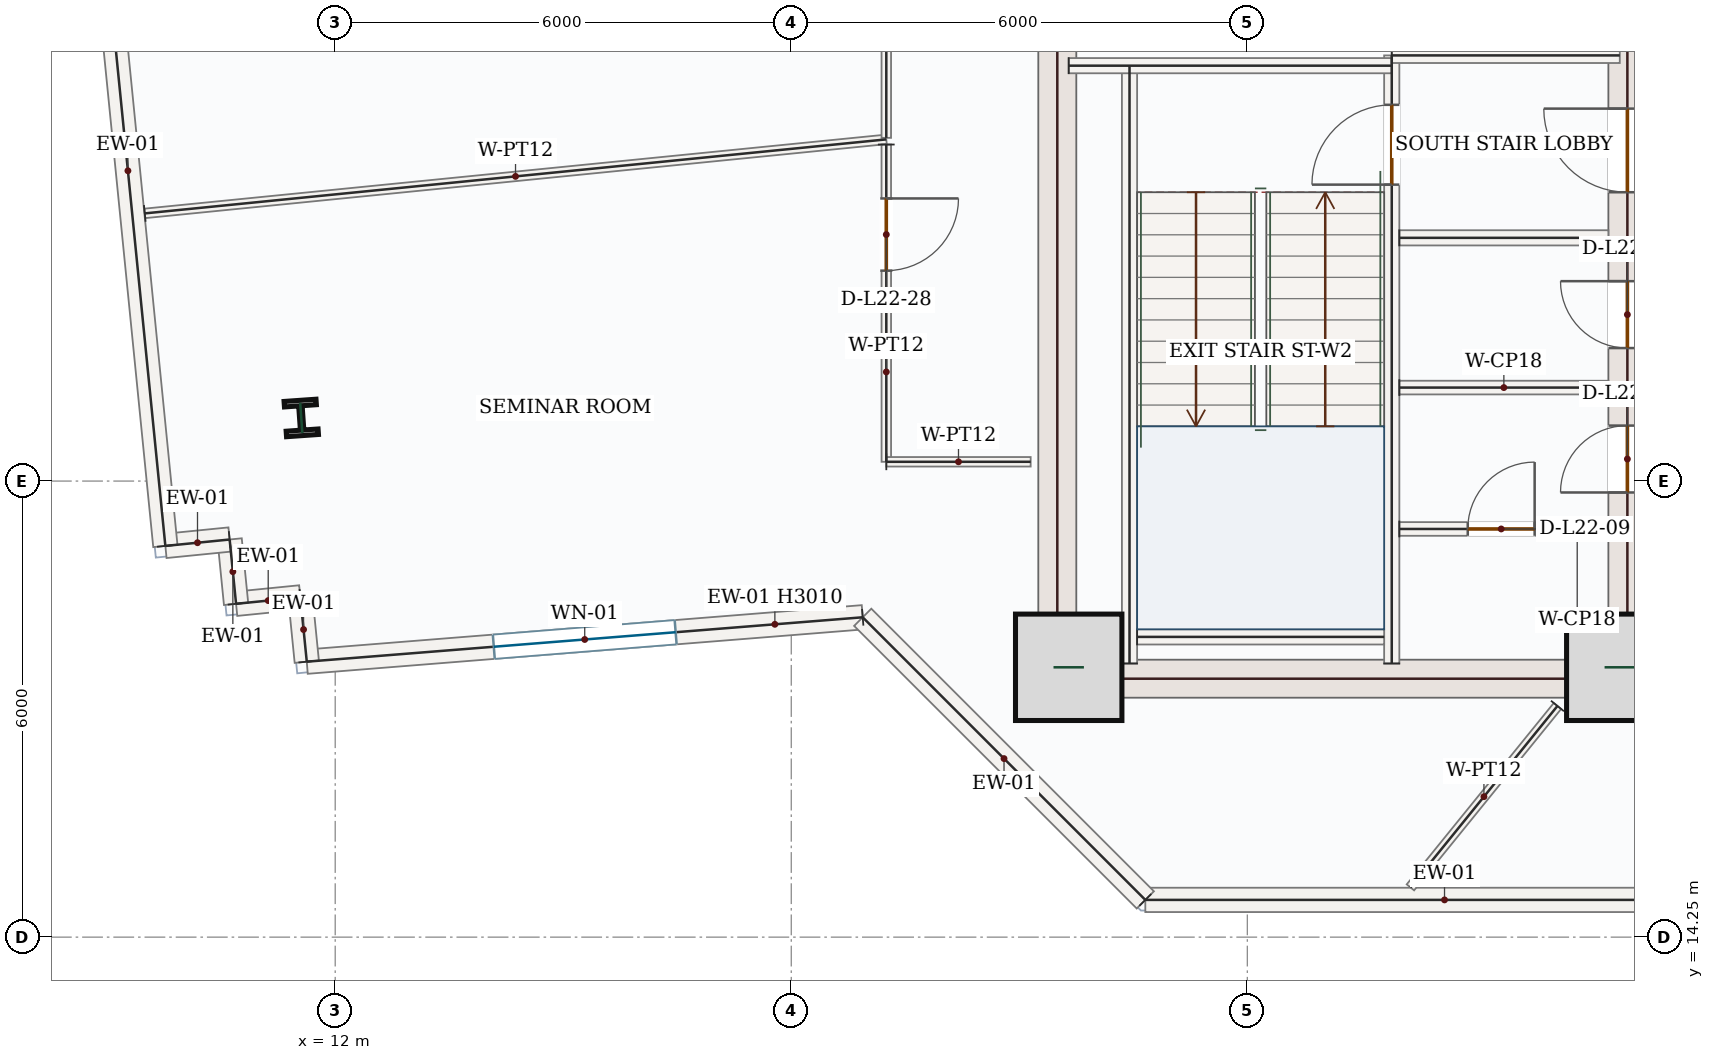
"""IFC4 building model, lengths in metres.
Left out: names, types, materials, properties, quantities, classifications, styles, units other than length and angle.
Written with IfcOpenShell. Run it as: python <this file> out.ifc"""

import sys

from ifc_helpers import new_model, si_unit, direction, frame, frame_2d, origin, origin_2d, place, context, subcontext, project, spatial, rectangle, i_section, extrude, source, transform, mapped, element, fill, save


model = new_model("IFC4")
c1 = context("Model", 3, precision=1e-05, world=origin(), true_north=direction((0.0, 1.0)))
c2 = subcontext(c1, "Body", "Model", "MODEL_VIEW")
j1 = project(units=[si_unit("LENGTHUNIT", "METRE"), si_unit("PLANEANGLEUNIT", "RADIAN")], contexts=[c1])
p1 = place(None, origin())
s1 = spatial("IfcSite", under=j1, at=p1, CompositionType="ELEMENT")
p2 = place(p1, origin())
s2 = spatial("IfcBuilding", under=s1, at=p2, CompositionType="ELEMENT")
p3 = place(p2, frame((0.0, 0.0, 100.5)))
s3 = spatial("IfcBuildingStorey", under=s2, at=p3, CompositionType="ELEMENT", Elevation=100.5)
m1 = source(origin(), c2, "Body", "SweptSolid", [
    extrude(rectangle(XDim=8.55, YDim=0.5, at=frame_2d((4.275, 0.0))), origin(), (0.0, 0.0, 1.0), 3.95),
])
p4 = place(p3, frame((21.5, 17.4, 0.0), z_axis=(0.0, 0.0, 1.0), x_axis=(0.0, 1.0, 0.0)))
e1 = element("IfcWall", 1, at=p4, inside=s3, PredefinedType="SHEAR", context=c2, shape_type="MappedRepresentation", body=[
    mapped(m1, transform((0.0, 0.0, 0.0), x_axis=(1.0, 0.0, 0.0), y_axis=(0.0, 1.0, 0.0), z_axis=(0.0, 0.0, 1.0), scale=1.0)),
])
p5 = place(p3, frame((29.0, 17.4, 0.0), z_axis=(0.0, 0.0, 1.0), x_axis=(0.0, 1.0, 0.0)))
e2 = element("IfcWall", 2, at=p5, inside=s3, PredefinedType="SHEAR", context=c2, shape_type="SweptSolid", body=[
    extrude(rectangle(XDim=8.55, YDim=0.5, at=frame_2d((4.275, 0.0))), origin(), (0.0, 0.0, 1.0), 3.95),
])
p6 = place(p5, frame((6.65, 0.0, 0.0)))
e3 = element("IfcOpeningElement", 3, at=p6, cuts=e2, PredefinedType="OPENING", context=c2, shape_type="SweptSolid", body=[
    extrude(rectangle(XDim=1.1, YDim=2.2, at=frame_2d((0.55, 1.1))), frame((0.0, 0.26, 0.0), z_axis=(0.0, -1.0, 0.0), x_axis=(1.0, 0.0, 0.0)), (0.0, 0.0, 1.0), 0.52),
])
p7 = place(p5, frame((2.7, 0.0, 0.0)))
e4 = element("IfcOpeningElement", 4, at=p7, cuts=e2, PredefinedType="OPENING", context=c2, shape_type="SweptSolid", body=[
    extrude(rectangle(XDim=0.88, YDim=2.1, at=frame_2d((0.44, 1.05))), frame((0.0, 0.26, 0.0), z_axis=(0.0, -1.0, 0.0), x_axis=(1.0, 0.0, 0.0)), (0.0, 0.0, 1.0), 0.52),
])
p8 = place(p5, frame((4.6, 0.0, 0.0)))
e5 = element("IfcOpeningElement", 5, at=p8, cuts=e2, PredefinedType="OPENING", context=c2, shape_type="SweptSolid", body=[
    extrude(rectangle(XDim=0.88, YDim=2.1, at=frame_2d((0.44, 1.05))), frame((0.0, 0.26, 0.0), z_axis=(0.0, -1.0, 0.0), x_axis=(1.0, 0.0, 0.0)), (0.0, 0.0, 1.0), 0.52),
])
m2 = source(origin(), c2, "Body", "SweptSolid", [
    extrude(rectangle(XDim=7.0, YDim=0.5, at=frame_2d((3.5, 0.0))), origin(), (0.0, 0.0, 1.0), 3.95),
])
p9 = place(p3, frame((21.75, 17.65, 0.0), z_axis=(0.0, 0.0, 1.0), x_axis=(1.0, 0.0, 0.0)))
e6 = element("IfcWall", 6, at=p9, inside=s3, PredefinedType="SHEAR", context=c2, shape_type="MappedRepresentation", body=[
    mapped(m2, transform((0.0, 0.0, 0.0), x_axis=(1.0, 0.0, 0.0), y_axis=(0.0, 1.0, 0.0), z_axis=(0.0, 0.0, 1.0), scale=1.0)),
])
m3 = source(origin(), c2, "Body", "SweptSolid", [
    extrude(rectangle(XDim=1.4, YDim=1.4, at=origin_2d()), origin(), (0.0, 0.0, 1.0), 4.2),
])
for number, where, z_axis, x_axis in (
    (7, (21.65, 17.8, 0.0), (0.0, 0.0, 1.0), (1.0, 0.0, 0.0)),
    (8, (28.9, 17.8, 0.0), (0.0, 0.0, 1.0), (1.0, 0.0, 0.0)),
):
    element("IfcColumn", number, at=place(p3, frame(where, z_axis=z_axis, x_axis=x_axis)), inside=s3, PredefinedType="COLUMN", context=c2, shape_type="MappedRepresentation", body=[
        mapped(m3, transform((0.0, 0.0, 0.0), x_axis=(1.0, 0.0, 0.0), y_axis=(0.0, 1.0, 0.0), z_axis=(0.0, 0.0, 1.0), scale=1.0)),
    ])
m4 = source(origin(), c2, "Body", "SweptSolid", [
    extrude(i_section(OverallWidth=0.421, OverallDepth=0.465, WebThickness=0.045, FlangeThickness=0.073, FilletRadius=0.018, at=origin_2d()), origin(), (0.0, 0.0, 1.0), 4.2),
])
p10 = place(p3, frame((11.553, 21.08, 0.0), z_axis=(0.0, 0.0, 1.0), x_axis=(0.99756405026, 0.069756473744, 0.0)))
e9 = element("IfcColumn", 9, at=p10, inside=s3, PredefinedType="COLUMN", context=c2, shape_type="MappedRepresentation", body=[
    mapped(m4, transform((0.0, 0.0, 0.0), x_axis=(1.0, 0.0, 0.0), y_axis=(0.0, 1.0, 0.0), z_axis=(0.0, 0.0, 1.0), scale=1.0)),
])
p11 = place(p3, frame((18.94, 18.458, 0.0), z_axis=(0.0, 0.0, 1.0), x_axis=(-0.996827539556, -0.079591811023, 0.0)))
e10 = element("IfcWall", 10, at=p11, inside=s3, PredefinedType="SOLIDWALL", context=c2, shape_type="SweptSolid", body=[
    extrude(rectangle(XDim=7.337, YDim=0.32, at=frame_2d((3.668, 0.0))), origin(), (0.0, 0.0, 1.0), 3.01),
])
p12 = place(p11, frame((2.469, 0.0, 0.85)))
e11 = element("IfcOpeningElement", 11, at=p12, cuts=e10, PredefinedType="OPENING", context=c2, shape_type="SweptSolid", body=[
    extrude(rectangle(XDim=2.4, YDim=1.8, at=frame_2d((1.2, 0.9))), frame((0.0, 0.17, 0.0), z_axis=(0.0, -1.0, 0.0), x_axis=(1.0, 0.0, 0.0)), (0.0, 0.0, 1.0), 0.34),
])
m5 = source(origin(), c2, "Body", "SweptSolid", [
    extrude(rectangle(XDim=0.85, YDim=0.32, at=frame_2d((0.425, 0.0))), origin(), (0.0, 0.0, 1.0), 3.95),
])
p13 = place(p3, frame((11.626, 17.874, 0.0), z_axis=(0.0, 0.0, 1.0), x_axis=(-0.09938995433, 0.995048560111, 0.0)))
e12 = element("IfcWall", 12, at=p13, inside=s3, PredefinedType="SOLIDWALL", context=c2, shape_type="MappedRepresentation", body=[
    mapped(m5, transform((0.0, 0.0, 0.0), x_axis=(1.0, 0.0, 0.0), y_axis=(0.0, 1.0, 0.0), z_axis=(0.0, 0.0, 1.0), scale=1.0)),
])
m6 = source(origin(), c2, "Body", "SweptSolid", [
    extrude(rectangle(XDim=0.85, YDim=0.32, at=frame_2d((0.425, 0.0))), origin(), (0.0, 0.0, 1.0), 3.95),
])
p14 = place(p3, frame((11.542, 18.72, 0.0), z_axis=(0.0, 0.0, 1.0), x_axis=(-0.995079749343, -0.09907720448, 0.0)))
e13 = element("IfcWall", 13, at=p14, inside=s3, PredefinedType="SOLIDWALL", context=c2, shape_type="MappedRepresentation", body=[
    mapped(m6, transform((0.0, 0.0, 0.0), x_axis=(1.0, 0.0, 0.0), y_axis=(0.0, 1.0, 0.0), z_axis=(0.0, 0.0, 1.0), scale=1.0)),
])
for number, where, z_axis, x_axis in (
    (14, (10.696, 18.635, 0.0), (0.0, 0.0, 1.0), (-0.099, 0.995, 0.0)),
    (15, (10.611, 19.481, 0.0), (0.0, 0.0, 1.0), (-0.995, -0.099, 0.0)),
):
    element("IfcWall", number, at=place(p3, frame(where, z_axis=z_axis, x_axis=x_axis)), inside=s3, PredefinedType="SOLIDWALL", context=c2, shape_type="MappedRepresentation", body=[
        mapped(m5, transform((0.0, 0.0, 0.0), x_axis=(1.0, 0.0, 0.0), y_axis=(0.0, 1.0, 0.0), z_axis=(0.0, 0.0, 1.0), scale=1.0)),
    ])
m7 = source(origin(), c2, "Body", "SweptSolid", [
    extrude(rectangle(XDim=9.92, YDim=0.32, at=frame_2d((4.96, 0.0))), origin(), (0.0, 0.0, 1.0), 3.95),
])
p15 = place(p3, frame((9.765, 19.397, 0.0), z_axis=(0.0, 0.0, 1.0), x_axis=(-0.099303907908, 0.995057151059, 0.0)))
e16 = element("IfcWall", 16, at=p15, inside=s3, PredefinedType="SOLIDWALL", context=c2, shape_type="MappedRepresentation", body=[
    mapped(m7, transform((0.0, 0.0, 0.0), x_axis=(1.0, 0.0, 0.0), y_axis=(0.0, 1.0, 0.0), z_axis=(0.0, 0.0, 1.0), scale=1.0)),
])
m8 = source(origin(), c2, "Body", "SweptSolid", [
    extrude(rectangle(XDim=7.873, YDim=0.32, at=frame_2d((3.936, 0.0))), origin(), (0.0, 0.0, 1.0), 3.95),
])
p16 = place(p3, frame((30.531, 14.74, 0.0), z_axis=(0.0, 0.0, 1.0), x_axis=(-1.0, 0.0, 0.0)))
e17 = element("IfcWall", 17, at=p16, inside=s3, PredefinedType="SOLIDWALL", context=c2, shape_type="MappedRepresentation", body=[
    mapped(m8, transform((0.0, 0.0, 0.0), x_axis=(1.0, 0.0, 0.0), y_axis=(0.0, 1.0, 0.0), z_axis=(0.0, 0.0, 1.0), scale=1.0)),
])
m9 = source(origin(), c2, "Body", "SweptSolid", [
    extrude(rectangle(XDim=5.258, YDim=0.32, at=frame_2d((2.629, 0.0))), origin(), (0.0, 0.0, 1.0), 3.95),
])
p17 = place(p3, frame((22.658, 14.74, 0.0), z_axis=(0.0, 0.0, 1.0), x_axis=(-0.707106781187, 0.707106781187, 0.0)))
e18 = element("IfcWall", 18, at=p17, inside=s3, PredefinedType="SOLIDWALL", context=c2, shape_type="MappedRepresentation", body=[
    mapped(m9, transform((0.0, 0.0, 0.0), x_axis=(1.0, 0.0, 0.0), y_axis=(0.0, 1.0, 0.0), z_axis=(0.0, 0.0, 1.0), scale=1.0)),
])
m10 = source(origin(), c2, "Body", "SweptSolid", [
    extrude(rectangle(XDim=7.87, YDim=0.2, at=frame_2d((3.935, 0.0))), origin(), (0.0, 0.0, 1.0), 3.95),
])
p18 = place(p3, frame((22.45, 17.85, 0.0), z_axis=(0.0, 0.0, 1.0), x_axis=(0.0, 1.0, 0.0)))
e19 = element("IfcWall", 19, at=p18, inside=s3, PredefinedType="SOLIDWALL", context=c2, shape_type="MappedRepresentation", body=[
    mapped(m10, transform((0.0, 0.0, 0.0), x_axis=(1.0, 0.0, 0.0), y_axis=(0.0, 1.0, 0.0), z_axis=(0.0, 0.0, 1.0), scale=1.0)),
])
p19 = place(p3, frame((25.9, 17.85, 0.0), z_axis=(0.0, 0.0, 1.0), x_axis=(0.0, 1.0, 0.0)))
e20 = element("IfcWall", 20, at=p19, inside=s3, PredefinedType="SOLIDWALL", context=c2, shape_type="SweptSolid", body=[
    extrude(rectangle(XDim=8.0, YDim=0.2, at=frame_2d((4.0, 0.0))), origin(), (0.0, 0.0, 1.0), 3.95),
])
p20 = place(p19, frame((6.3, 0.0, 0.0)))
e21 = element("IfcOpeningElement", 21, at=p20, cuts=e20, PredefinedType="OPENING", context=c2, shape_type="SweptSolid", body=[
    extrude(rectangle(XDim=1.05, YDim=2.15, at=frame_2d((0.525, 1.075))), frame((0.0, 0.11, 0.0), z_axis=(0.0, -1.0, 0.0), x_axis=(1.0, 0.0, 0.0)), (0.0, 0.0, 1.0), 0.22),
])
m11 = source(origin(), c2, "Body", "SweptSolid", [
    extrude(rectangle(XDim=4.25, YDim=0.2, at=frame_2d((2.125, 0.0))), origin(), (0.0, 0.0, 1.0), 3.95),
])
p21 = place(p3, frame((21.65, 25.715, 0.0), z_axis=(0.0, 0.0, 1.0), x_axis=(1.0, 0.0, 0.0)))
e22 = element("IfcWall", 22, at=p21, inside=s3, PredefinedType="SOLIDWALL", context=c2, shape_type="MappedRepresentation", body=[
    mapped(m11, transform((0.0, 0.0, 0.0), x_axis=(1.0, 0.0, 0.0), y_axis=(0.0, 1.0, 0.0), z_axis=(0.0, 0.0, 1.0), scale=1.0)),
])
m12 = source(origin(), c2, "Body", "SweptSolid", [
    extrude(rectangle(XDim=3.0, YDim=0.2, at=frame_2d((1.5, 0.0))), origin(), (0.0, 0.0, 1.0), 3.95),
])
p22 = place(p3, frame((25.9, 25.85, 0.0), z_axis=(0.0, 0.0, 1.0), x_axis=(1.0, 0.0, 0.0)))
e23 = element("IfcWall", 23, at=p22, inside=s3, PredefinedType="SOLIDWALL", context=c2, shape_type="MappedRepresentation", body=[
    mapped(m12, transform((0.0, 0.0, 0.0), x_axis=(1.0, 0.0, 0.0), y_axis=(0.0, 1.0, 0.0), z_axis=(0.0, 0.0, 1.0), scale=1.0)),
])
m13 = source(origin(), c2, "Body", "SweptSolid", [
    extrude(rectangle(XDim=3.25, YDim=0.2, at=frame_2d((1.625, 0.0))), origin(), (0.0, 0.0, 1.0), 3.95),
])
p23 = place(p3, frame((22.55, 18.2, 0.0), z_axis=(0.0, 0.0, 1.0), x_axis=(1.0, 0.0, 0.0)))
e24 = element("IfcWall", 24, at=p23, inside=s3, PredefinedType="SOLIDWALL", context=c2, shape_type="MappedRepresentation", body=[
    mapped(m13, transform((0.0, 0.0, 0.0), x_axis=(1.0, 0.0, 0.0), y_axis=(0.0, 1.0, 0.0), z_axis=(0.0, 0.0, 1.0), scale=1.0)),
])
m14 = source(origin(), c2, "Body", "SweptSolid", [
    extrude(rectangle(XDim=2.75, YDim=0.2, at=frame_2d((1.375, 0.0))), origin(), (0.0, 0.0, 1.0), 3.95),
])
p24 = place(p3, frame((26.0, 23.45, 0.0), z_axis=(0.0, 0.0, 1.0), x_axis=(1.0, 0.0, 0.0)))
e25 = element("IfcWall", 25, at=p24, inside=s3, PredefinedType="SOLIDWALL", context=c2, shape_type="MappedRepresentation", body=[
    mapped(m14, transform((0.0, 0.0, 0.0), x_axis=(1.0, 0.0, 0.0), y_axis=(0.0, 1.0, 0.0), z_axis=(0.0, 0.0, 1.0), scale=1.0)),
])
p25 = place(p3, frame((26.0, 19.62, 0.0), z_axis=(0.0, 0.0, 1.0), x_axis=(1.0, 0.0, 0.0)))
e26 = element("IfcWall", 26, at=p25, inside=s3, PredefinedType="PARTITIONING", context=c2, shape_type="SweptSolid", body=[
    extrude(rectangle(XDim=2.75, YDim=0.18, at=frame_2d((1.375, 0.0))), origin(), (0.0, 0.0, 1.0), 3.95),
])
p26 = place(p25, frame((0.9, 0.0, 0.0)))
e27 = element("IfcOpeningElement", 27, at=p26, cuts=e26, PredefinedType="OPENING", context=c2, shape_type="SweptSolid", body=[
    extrude(rectangle(XDim=0.88, YDim=2.1, at=frame_2d((0.44, 1.05))), frame((0.0, 0.1, 0.0), z_axis=(0.0, -1.0, 0.0), x_axis=(1.0, 0.0, 0.0)), (0.0, 0.0, 1.0), 0.2),
])
m15 = source(origin(), c2, "Body", "SweptSolid", [
    extrude(rectangle(XDim=2.75, YDim=0.18, at=frame_2d((1.375, 0.0))), origin(), (0.0, 0.0, 1.0), 3.95),
])
p27 = place(p3, frame((26.0, 21.48, 0.0), z_axis=(0.0, 0.0, 1.0), x_axis=(1.0, 0.0, 0.0)))
e28 = element("IfcWall", 28, at=p27, inside=s3, PredefinedType="PARTITIONING", context=c2, shape_type="MappedRepresentation", body=[
    mapped(m15, transform((0.0, 0.0, 0.0), x_axis=(1.0, 0.0, 0.0), y_axis=(0.0, 1.0, 0.0), z_axis=(0.0, 0.0, 1.0), scale=1.0)),
])
m16 = source(origin(), c2, "Body", "SweptSolid", [
    extrude(rectangle(XDim=3.072, YDim=0.125, at=frame_2d((1.536, 0.0))), origin(), (0.0, 0.0, 1.0), 3.95),
])
p28 = place(p3, frame((28.08, 17.291, 0.0), z_axis=(0.0, 0.0, 1.0), x_axis=(-0.629760486176, -0.776789373029, 0.0)))
e29 = element("IfcWall", 29, at=p28, inside=s3, PredefinedType="PARTITIONING", context=c2, shape_type="MappedRepresentation", body=[
    mapped(m16, transform((0.0, 0.0, 0.0), x_axis=(1.0, 0.0, 0.0), y_axis=(0.0, 1.0, 0.0), z_axis=(0.0, 0.0, 1.0), scale=1.0)),
])
m17 = source(origin(), c2, "Body", "SweptSolid", [
    extrude(rectangle(XDim=9.804, YDim=0.125, at=frame_2d((4.902, 0.0))), origin(), (0.0, 0.0, 1.0), 3.95),
])
p29 = place(p3, frame((9.495, 23.771, 0.0), z_axis=(0.0, 0.0, 1.0), x_axis=(0.995053942122, 0.099336057238, 0.0)))
e30 = element("IfcWall", 30, at=p29, inside=s3, PredefinedType="PARTITIONING", context=c2, shape_type="MappedRepresentation", body=[
    mapped(m17, transform((0.0, 0.0, 0.0), x_axis=(1.0, 0.0, 0.0), y_axis=(0.0, 1.0, 0.0), z_axis=(0.0, 0.0, 1.0), scale=1.0)),
])
p30 = place(p3, frame((19.25, 24.677, 0.0), z_axis=(0.0, 0.0, 1.0), x_axis=(0.000116979586, -0.999999993158, 0.0)))
e31 = element("IfcWall", 31, at=p30, inside=s3, PredefinedType="PARTITIONING", context=c2, shape_type="SweptSolid", body=[
    extrude(rectangle(XDim=4.174, YDim=0.125, at=frame_2d((2.087, 0.0))), origin(), (0.0, 0.0, 1.0), 3.95),
])
p31 = place(p30, frame((0.709, 0.0, 0.0)))
e32 = element("IfcOpeningElement", 32, at=p31, cuts=e31, PredefinedType="OPENING", context=c2, shape_type="SweptSolid", body=[
    extrude(rectangle(XDim=0.95, YDim=2.15, at=frame_2d((0.475, 1.075))), frame((0.0, 0.073, 0.0), z_axis=(0.0, -1.0, 0.0), x_axis=(1.0, 0.0, 0.0)), (0.0, 0.0, 1.0), 0.145),
])
m18 = source(origin(), c2, "Body", "SweptSolid", [
    extrude(rectangle(XDim=1.899, YDim=0.125, at=frame_2d((0.949, 0.0))), origin(), (0.0, 0.0, 1.0), 3.95),
])
p32 = place(p3, frame((19.25, 20.503, 0.0), z_axis=(0.0, 0.0, 1.0), x_axis=(0.999999991735, 0.000128567754, 0.0)))
e33 = element("IfcWall", 33, at=p32, inside=s3, PredefinedType="PARTITIONING", context=c2, shape_type="MappedRepresentation", body=[
    mapped(m18, transform((0.0, 0.0, 0.0), x_axis=(1.0, 0.0, 0.0), y_axis=(0.0, 1.0, 0.0), z_axis=(0.0, 0.0, 1.0), scale=1.0)),
])
p33 = place(p3, frame((19.253, 33.497, 0.0), z_axis=(0.0, 0.0, 1.0), x_axis=(-0.000307554646, -0.999999952705, 0.0)))
e34 = element("IfcWall", 34, at=p33, inside=s3, PredefinedType="PARTITIONING", context=c2, shape_type="SweptSolid", body=[
    extrude(rectangle(XDim=8.732, YDim=0.125, at=frame_2d((4.366, 0.0))), origin(), (0.0, 0.0, 1.0), 3.95),
])
p34 = place(p33, frame((6.07, 0.0, 0.0)))
e35 = element("IfcOpeningElement", 35, at=p34, cuts=e34, PredefinedType="OPENING", context=c2, shape_type="SweptSolid", body=[
    extrude(rectangle(XDim=0.95, YDim=2.15, at=frame_2d((0.475, 1.075))), frame((0.0, 0.073, 0.0), z_axis=(0.0, -1.0, 0.0), x_axis=(1.0, 0.0, 0.0)), (0.0, 0.0, 1.0), 0.145),
])
m19 = source(origin(), c2, "Body", "SweptSolid", [
    extrude(rectangle(XDim=2.4, YDim=1.8, at=frame_2d((1.2, 0.9))), frame((0.0, 0.03, 0.0), z_axis=(0.0, -1.0, 0.0), x_axis=(1.0, 0.0, 0.0)), (0.0, 0.0, 1.0), 0.06),
])
p35 = place(p12, origin())
e36 = element("IfcWindow", 36, at=p35, inside=s3, PartitioningType="DOUBLE_PANEL_VERTICAL", PredefinedType="WINDOW", context=c2, shape_type="MappedRepresentation", body=[
    mapped(m19, transform((0.0, 0.0, 0.0), x_axis=(1.0, 0.0, 0.0), y_axis=(0.0, 1.0, 0.0), z_axis=(0.0, 0.0, 1.0), scale=1.0)),
])
fill(e11, e36)
m20 = source(origin(), c2, "Body", "SweptSolid", [
    extrude(rectangle(XDim=1.05, YDim=2.15, at=frame_2d((0.525, 1.075))), frame((0.0, 0.025, 0.0), z_axis=(0.0, -1.0, 0.0), x_axis=(1.0, 0.0, 0.0)), (0.0, 0.0, 1.0), 0.05),
])
p36 = place(p20, origin())
e37 = element("IfcDoor", 37, at=p36, inside=s3, OperationType="SINGLE_SWING_LEFT", PredefinedType="DOOR", context=c2, shape_type="MappedRepresentation", body=[
    mapped(m20, transform((0.0, 0.0, 0.0), x_axis=(1.0, 0.0, 0.0), y_axis=(0.0, 1.0, 0.0), z_axis=(0.0, 0.0, 1.0), scale=1.0)),
])
fill(e21, e37)
m21 = source(origin(), c2, "Body", "SweptSolid", [
    extrude(rectangle(XDim=1.1, YDim=2.2, at=frame_2d((0.55, 1.1))), frame((0.0, 0.025, 0.0), z_axis=(0.0, -1.0, 0.0), x_axis=(1.0, 0.0, 0.0)), (0.0, 0.0, 1.0), 0.05),
])
p37 = place(p6, origin())
e38 = element("IfcDoor", 38, at=p37, inside=s3, OperationType="SINGLE_SWING_RIGHT", PredefinedType="DOOR", context=c2, shape_type="MappedRepresentation", body=[
    mapped(m21, transform((0.0, 0.0, 0.0), x_axis=(1.0, 0.0, 0.0), y_axis=(0.0, 1.0, 0.0), z_axis=(0.0, 0.0, 1.0), scale=1.0)),
])
fill(e3, e38)
m22 = source(origin(), c2, "Body", "SweptSolid", [
    extrude(rectangle(XDim=0.88, YDim=2.1, at=frame_2d((0.44, 1.05))), frame((0.0, 0.025, 0.0), z_axis=(0.0, -1.0, 0.0), x_axis=(1.0, 0.0, 0.0)), (0.0, 0.0, 1.0), 0.05),
])
p38 = place(p26, origin())
e39 = element("IfcDoor", 39, at=p38, inside=s3, OperationType="SINGLE_SWING_RIGHT", PredefinedType="DOOR", context=c2, shape_type="MappedRepresentation", body=[
    mapped(m22, transform((0.0, 0.0, 0.0), x_axis=(1.0, 0.0, 0.0), y_axis=(0.0, 1.0, 0.0), z_axis=(0.0, 0.0, 1.0), scale=1.0)),
])
fill(e27, e39)
p39 = place(p7, origin())
e40 = element("IfcDoor", 40, at=p39, inside=s3, OperationType="SINGLE_SWING_LEFT", PredefinedType="DOOR", context=c2, shape_type="MappedRepresentation", body=[
    mapped(m22, transform((0.0, 0.0, 0.0), x_axis=(1.0, 0.0, 0.0), y_axis=(0.0, 1.0, 0.0), z_axis=(0.0, 0.0, 1.0), scale=1.0)),
])
fill(e4, e40)
p40 = place(p8, origin())
e41 = element("IfcDoor", 41, at=p40, inside=s3, OperationType="SINGLE_SWING_RIGHT", PredefinedType="DOOR", context=c2, shape_type="MappedRepresentation", body=[
    mapped(m22, transform((0.0, 0.0, 0.0), x_axis=(1.0, 0.0, 0.0), y_axis=(0.0, 1.0, 0.0), z_axis=(0.0, 0.0, 1.0), scale=1.0)),
])
fill(e5, e41)
m23 = source(origin(), c2, "Body", "SweptSolid", [
    extrude(rectangle(XDim=0.95, YDim=2.15, at=frame_2d((0.475, 1.075))), frame((0.0, 0.025, 0.0), z_axis=(0.0, -1.0, 0.0), x_axis=(1.0, 0.0, 0.0)), (0.0, 0.0, 1.0), 0.05),
])
p41 = place(p31, origin())
e42 = element("IfcDoor", 42, at=p41, inside=s3, OperationType="SINGLE_SWING_LEFT", PredefinedType="DOOR", context=c2, shape_type="MappedRepresentation", body=[
    mapped(m23, transform((0.0, 0.0, 0.0), x_axis=(1.0, 0.0, 0.0), y_axis=(0.0, 1.0, 0.0), z_axis=(0.0, 0.0, 1.0), scale=1.0)),
])
fill(e32, e42)
save(model, sys.argv[1])
